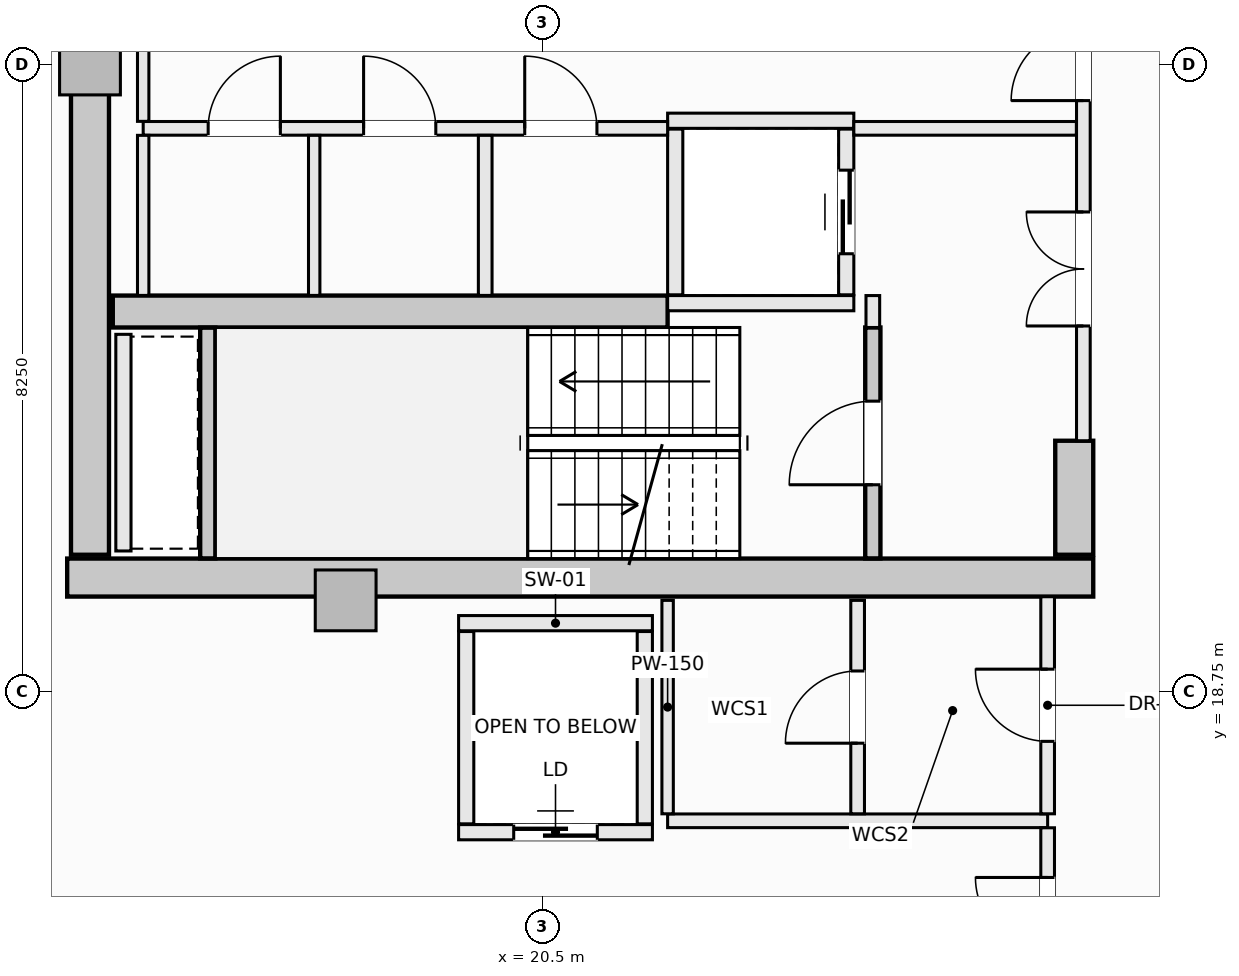
"""IFC4 building model, lengths in metres.
Left out: names, types, materials, properties, quantities, classifications, styles, units other than length and angle.
Written with IfcOpenShell. Run it as: python <this file> out.ifc"""

import sys

from ifc_helpers import new_model, si_unit, direction, frame, frame_2d, origin, origin_2d, place, context, subcontext, project, spatial, rectangle, extrude, element, fill, save


model = new_model("IFC4")
c1 = context("Model", 3, precision=1e-05, world=origin(), true_north=direction((0.0, 1.0)))
c2 = subcontext(c1, "Body", "Model", "MODEL_VIEW")
j1 = project(units=[si_unit("LENGTHUNIT", "METRE"), si_unit("PLANEANGLEUNIT", "RADIAN")], contexts=[c1])
p1 = place(None, origin())
s1 = spatial("IfcSite", under=j1, at=p1, CompositionType="ELEMENT")
p2 = place(p1, origin())
s2 = spatial("IfcBuilding", under=s1, at=p2, CompositionType="ELEMENT")
p3 = place(p2, frame((0.0, 0.0, 229.4)))
s3 = spatial("IfcBuildingStorey", under=s2, at=p3, CompositionType="ELEMENT", Elevation=229.4)
p4 = place(p3, frame((14.25, 20.25, -0.27), z_axis=(0.0, 0.0, 1.0), x_axis=(1.0, 0.0, 0.0)))
e1 = element("IfcWall", 1, at=p4, inside=s3, PredefinedType="SHEAR", context=c2, shape_type="SweptSolid", body=[
    extrude(rectangle(XDim=13.5, YDim=0.5, at=frame_2d((6.75, 0.0))), origin(), (0.0, 0.0, 1.0), 3.3),
])
p5 = place(p3, frame((14.55, 20.55, -0.27), z_axis=(0.0, 0.0, 1.0), x_axis=(0.0, 1.0, 0.0)))
e2 = element("IfcWall", 2, at=p5, inside=s3, PredefinedType="SHEAR", context=c2, shape_type="SweptSolid", body=[
    extrude(rectangle(XDim=12.9, YDim=0.5, at=frame_2d((6.45, 0.0))), origin(), (0.0, 0.0, 1.0), 3.3),
])
p6 = place(p3, frame((27.5, 20.55, -0.27), z_axis=(0.0, 0.0, 1.0), x_axis=(0.0, 1.0, 0.0)))
e3 = element("IfcWall", 3, at=p6, inside=s3, PredefinedType="SHEAR", context=c2, shape_type="SweptSolid", body=[
    extrude(rectangle(XDim=1.5, YDim=0.5, at=frame_2d((0.75, 0.0))), origin(), (0.0, 0.0, 1.0), 3.3),
])
p7 = place(p3, frame((14.85, 23.75, -0.27), z_axis=(0.0, 0.0, 1.0), x_axis=(1.0, 0.0, 0.0)))
e4 = element("IfcWall", 4, at=p7, inside=s3, PredefinedType="SHEAR", context=c2, shape_type="SweptSolid", body=[
    extrude(rectangle(XDim=7.3, YDim=0.42, at=frame_2d((3.65, 0.0))), origin(), (0.0, 0.0, 1.0), 3.3),
])
for number, where, z_axis, x_axis in (
    (5, (14.55, 27.0, -0.27), (0.0, 0.0, 1.0), (1.0, 0.0, 0.0)),
    (6, (17.914, 19.95, -0.27), (0.0, 0.0, 1.0), (1.0, 0.0, 0.0)),
):
    element("IfcColumn", number, at=place(p3, frame(where, z_axis=z_axis, x_axis=x_axis)), inside=s3, PredefinedType="PILASTER", context=c2, shape_type="SweptSolid", body=[
        extrude(rectangle(XDim=0.8, YDim=0.8, at=origin_2d()), origin(), (0.0, 0.0, 1.0), 3.3),
    ])
p8 = place(p3, frame((8.691, 17.1, 0.0), z_axis=(0.0, 0.0, 1.0), x_axis=(0.901348331142, -0.433094892545, 0.0)))
e7 = element("IfcWall", 7, at=p8, inside=s3, PredefinedType="SOLIDWALL", context=c2, shape_type="SweptSolid", body=[
    extrude(rectangle(XDim=6.021, YDim=0.3, at=frame_2d((3.01, 0.0))), origin(), (0.0, 0.0, 1.0), 2.605),
])
p9 = place(p8, frame((1.91, 0.0, 0.72)))
e8 = element("IfcOpeningElement", 8, at=p9, cuts=e7, PredefinedType="OPENING", context=c2, shape_type="SweptSolid", body=[
    extrude(rectangle(XDim=2.2, YDim=1.65, at=frame_2d((1.1, 0.825))), frame((0.0, 0.16, 0.0), z_axis=(0.0, -1.0, 0.0), x_axis=(1.0, 0.0, 0.0)), (0.0, 0.0, 1.0), 0.32),
])
p10 = place(p3, frame((24.85, 20.502, -0.27), z_axis=(0.0, 0.0, 1.0), x_axis=(0.0, 1.0, 0.0)))
e9 = element("IfcWall", 9, at=p10, inside=s3, PredefinedType="SHEAR", context=c2, shape_type="SweptSolid", body=[
    extrude(rectangle(XDim=3.038, YDim=0.2, at=frame_2d((1.519, 0.0))), origin(), (0.0, 0.0, 1.0), 3.3),
])
p11 = place(p10, frame((0.969, 0.0, 0.27)))
e10 = element("IfcOpeningElement", 10, at=p11, cuts=e9, PredefinedType="OPENING", context=c2, shape_type="SweptSolid", body=[
    extrude(rectangle(XDim=1.1, YDim=2.15, at=frame_2d((0.55, 1.075))), frame((0.0, 0.11, 0.0), z_axis=(0.0, -1.0, 0.0), x_axis=(1.0, 0.0, 0.0)), (0.0, 0.0, 1.0), 0.22),
])
p12 = place(p3, frame((16.1, 20.502, -0.27), z_axis=(0.0, 0.0, 1.0), x_axis=(0.0, 1.0, 0.0)))
e11 = element("IfcWall", 11, at=p12, inside=s3, PredefinedType="SHEAR", context=c2, shape_type="SweptSolid", body=[
    extrude(rectangle(XDim=3.036, YDim=0.2, at=frame_2d((1.518, 0.0))), origin(), (0.0, 0.0, 1.0), 3.3),
])
for number, where, z_axis, x_axis in (
    (12, (22.15, 26.26, 0.0), (0.0, 0.0, 1.0), (1.0, 0.0, 0.0)),
    (13, (22.15, 23.86, 0.0), (0.0, 0.0, 1.0), (1.0, 0.0, 0.0)),
):
    element("IfcWall", number, at=place(p3, frame(where, z_axis=z_axis, x_axis=x_axis)), inside=s3, PredefinedType="SOLIDWALL", context=c2, shape_type="SweptSolid", body=[
        extrude(rectangle(XDim=2.45, YDim=0.2, at=frame_2d((1.225, 0.0))), origin(), (0.0, 0.0, 1.0), 3.03),
    ])
p13 = place(p3, frame((22.25, 23.97, 0.0), z_axis=(0.0, 0.0, 1.0), x_axis=(0.0, 1.0, 0.0)))
e14 = element("IfcWall", 14, at=p13, inside=s3, PredefinedType="SOLIDWALL", context=c2, shape_type="SweptSolid", body=[
    extrude(rectangle(XDim=2.18, YDim=0.2, at=frame_2d((1.09, 0.0))), origin(), (0.0, 0.0, 1.0), 3.03),
])
p14 = place(p3, frame((24.5, 23.97, 0.0), z_axis=(0.0, 0.0, 1.0), x_axis=(0.0, 1.0, 0.0)))
e15 = element("IfcWall", 15, at=p14, inside=s3, PredefinedType="SOLIDWALL", context=c2, shape_type="SweptSolid", body=[
    extrude(rectangle(XDim=2.18, YDim=0.2, at=frame_2d((1.09, 0.0))), origin(), (0.0, 0.0, 1.0), 3.03),
])
p15 = place(p14, frame((0.54, 0.0, 0.0)))
e16 = element("IfcOpeningElement", 16, at=p15, cuts=e15, PredefinedType="OPENING", context=c2, shape_type="SweptSolid", body=[
    extrude(rectangle(XDim=1.1, YDim=2.2, at=frame_2d((0.55, 1.1))), frame((0.0, 0.11, 0.0), z_axis=(0.0, -1.0, 0.0), x_axis=(1.0, 0.0, 0.0)), (0.0, 0.0, 1.0), 0.22),
])
p16 = place(p3, frame((19.4, 19.65, 0.0), z_axis=(0.0, 0.0, 1.0), x_axis=(1.0, 0.0, 0.0)))
e17 = element("IfcWall", 17, at=p16, inside=s3, PredefinedType="SOLIDWALL", context=c2, shape_type="SweptSolid", body=[
    extrude(rectangle(XDim=2.55, YDim=0.2, at=frame_2d((1.275, 0.0))), origin(), (0.0, 0.0, 1.0), 3.03),
])
p17 = place(p3, frame((19.4, 16.9, 0.0), z_axis=(0.0, 0.0, 1.0), x_axis=(1.0, 0.0, 0.0)))
e18 = element("IfcWall", 18, at=p17, inside=s3, PredefinedType="SOLIDWALL", context=c2, shape_type="SweptSolid", body=[
    extrude(rectangle(XDim=2.55, YDim=0.2, at=frame_2d((1.275, 0.0))), origin(), (0.0, 0.0, 1.0), 3.03),
])
p18 = place(p17, frame((0.725, 0.0, 0.0)))
e19 = element("IfcOpeningElement", 19, at=p18, cuts=e18, PredefinedType="OPENING", context=c2, shape_type="SweptSolid", body=[
    extrude(rectangle(XDim=1.1, YDim=2.2, at=frame_2d((0.55, 1.1))), frame((0.0, 0.11, 0.0), z_axis=(0.0, -1.0, 0.0), x_axis=(1.0, 0.0, 0.0)), (0.0, 0.0, 1.0), 0.22),
])
for number, where, z_axis, x_axis in (
    (20, (19.5, 17.01, 0.0), (0.0, 0.0, 1.0), (0.0, 1.0, 0.0)),
    (21, (21.85, 17.01, 0.0), (0.0, 0.0, 1.0), (0.0, 1.0, 0.0)),
):
    element("IfcWall", number, at=place(p3, frame(where, z_axis=z_axis, x_axis=x_axis)), inside=s3, PredefinedType="SOLIDWALL", context=c2, shape_type="SweptSolid", body=[
        extrude(rectangle(XDim=2.53, YDim=0.2, at=frame_2d((1.265, 0.0))), origin(), (0.0, 0.0, 1.0), 3.03),
    ])
p19 = place(p3, frame((14.99, 20.6, 0.0), z_axis=(0.0, 0.0, 1.0), x_axis=(0.0, 1.0, 0.0)))
e22 = element("IfcWall", 22, at=p19, inside=s3, PredefinedType="SOLIDWALL", context=c2, shape_type="SweptSolid", body=[
    extrude(rectangle(XDim=2.85, YDim=0.2, at=frame_2d((1.425, 0.0))), origin(), (0.0, 0.0, 1.0), 3.03),
])
p20 = place(p3, frame((24.85, 23.54, 0.0), z_axis=(0.0, 0.0, 1.0), x_axis=(0.0, 1.0, 0.0)))
e23 = element("IfcWall", 23, at=p20, inside=s3, PredefinedType="SOLIDWALL", context=c2, shape_type="SweptSolid", body=[
    extrude(rectangle(XDim=0.42, YDim=0.18, at=frame_2d((0.21, 0.0))), origin(), (0.0, 0.0, 1.0), 3.03),
])
p21 = place(p3, frame((27.62, 22.05, 0.0), z_axis=(0.0, 0.0, 1.0), x_axis=(0.0, 1.0, 0.0)))
e24 = element("IfcWall", 24, at=p21, inside=s3, PredefinedType="SOLIDWALL", context=c2, shape_type="SweptSolid", body=[
    extrude(rectangle(XDim=9.9, YDim=0.18, at=frame_2d((4.95, 0.0))), origin(), (0.0, 0.0, 1.0), 3.03),
])
p22 = place(p21, frame((4.475, 0.0, 0.0)))
e25 = element("IfcOpeningElement", 25, at=p22, cuts=e24, PredefinedType="OPENING", context=c2, shape_type="SweptSolid", body=[
    extrude(rectangle(XDim=0.95, YDim=2.1, at=frame_2d((0.475, 1.05))), frame((0.0, 0.1, 0.0), z_axis=(0.0, -1.0, 0.0), x_axis=(1.0, 0.0, 0.0)), (0.0, 0.0, 1.0), 0.2),
])
p23 = place(p21, frame((6.89, 0.0, 0.0)))
e26 = element("IfcOpeningElement", 26, at=p23, cuts=e24, PredefinedType="OPENING", context=c2, shape_type="SweptSolid", body=[
    extrude(rectangle(XDim=1.5, YDim=2.2, at=frame_2d((0.75, 1.1))), frame((0.0, 0.1, 0.0), z_axis=(0.0, -1.0, 0.0), x_axis=(1.0, 0.0, 0.0)), (0.0, 0.0, 1.0), 0.2),
])
p24 = place(p21, frame((1.51, 0.0, 0.0)))
e27 = element("IfcOpeningElement", 27, at=p24, cuts=e24, PredefinedType="OPENING", context=c2, shape_type="SweptSolid", body=[
    extrude(rectangle(XDim=1.5, YDim=2.2, at=frame_2d((0.75, 1.1))), frame((0.0, 0.1, 0.0), z_axis=(0.0, -1.0, 0.0), x_axis=(1.0, 0.0, 0.0)), (0.0, 0.0, 1.0), 0.2),
])
p25 = place(p3, frame((15.25, 26.16, 0.0), z_axis=(0.0, 0.0, 1.0), x_axis=(1.0, 0.0, 0.0)))
e28 = element("IfcWall", 28, at=p25, inside=s3, PredefinedType="SOLIDWALL", context=c2, shape_type="SweptSolid", body=[
    extrude(rectangle(XDim=6.9, YDim=0.18, at=frame_2d((3.45, 0.0))), origin(), (0.0, 0.0, 1.0), 3.03),
])
p26 = place(p25, frame((5.02, 0.0, 0.0)))
e29 = element("IfcOpeningElement", 29, at=p26, cuts=e28, PredefinedType="OPENING", context=c2, shape_type="SweptSolid", body=[
    extrude(rectangle(XDim=0.95, YDim=2.1, at=frame_2d((0.475, 1.05))), frame((0.0, 0.1, 0.0), z_axis=(0.0, -1.0, 0.0), x_axis=(1.0, 0.0, 0.0)), (0.0, 0.0, 1.0), 0.2),
])
p27 = place(p25, frame((0.855, 0.0, 0.0)))
e30 = element("IfcOpeningElement", 30, at=p27, cuts=e28, PredefinedType="OPENING", context=c2, shape_type="SweptSolid", body=[
    extrude(rectangle(XDim=0.95, YDim=2.1, at=frame_2d((0.475, 1.05))), frame((0.0, 0.1, 0.0), z_axis=(0.0, -1.0, 0.0), x_axis=(1.0, 0.0, 0.0)), (0.0, 0.0, 1.0), 0.2),
])
p28 = place(p25, frame((2.9, 0.0, 0.0)))
e31 = element("IfcOpeningElement", 31, at=p28, cuts=e28, PredefinedType="OPENING", context=c2, shape_type="SweptSolid", body=[
    extrude(rectangle(XDim=0.95, YDim=2.1, at=frame_2d((0.475, 1.05))), frame((0.0, 0.1, 0.0), z_axis=(0.0, -1.0, 0.0), x_axis=(1.0, 0.0, 0.0)), (0.0, 0.0, 1.0), 0.2),
])
p29 = place(p3, frame((24.6, 26.16, 0.0), z_axis=(0.0, 0.0, 1.0), x_axis=(1.0, 0.0, 0.0)))
e32 = element("IfcWall", 32, at=p29, inside=s3, PredefinedType="SOLIDWALL", context=c2, shape_type="SweptSolid", body=[
    extrude(rectangle(XDim=2.928, YDim=0.18, at=frame_2d((1.464, 0.0))), origin(), (0.0, 0.0, 1.0), 3.03),
])
p30 = place(p3, frame((15.25, 23.962, 0.0), z_axis=(0.0, 0.0, 1.0), x_axis=(0.0, 1.0, 0.0)))
e33 = element("IfcWall", 33, at=p30, inside=s3, PredefinedType="PARTITIONING", context=c2, shape_type="SweptSolid", body=[
    extrude(rectangle(XDim=2.106, YDim=0.15, at=frame_2d((1.053, 0.0))), origin(), (0.0, 0.0, 1.0), 3.03),
])
p31 = place(p3, frame((15.25, 26.252, 0.0), z_axis=(0.0, 0.0, 1.0), x_axis=(0.0, 1.0, 0.0)))
e34 = element("IfcWall", 34, at=p31, inside=s3, PredefinedType="PARTITIONING", context=c2, shape_type="SweptSolid", body=[
    extrude(rectangle(XDim=1.496, YDim=0.15, at=frame_2d((0.748, 0.0))), origin(), (0.0, 0.0, 1.0), 3.03),
])
p32 = place(p3, frame((19.75, 23.962, 0.0), z_axis=(0.0, 0.0, 1.0), x_axis=(0.0, 1.0, 0.0)))
e35 = element("IfcWall", 35, at=p32, inside=s3, PredefinedType="SOLIDWALL", context=c2, shape_type="SweptSolid", body=[
    extrude(rectangle(XDim=2.106, YDim=0.18, at=frame_2d((1.053, 0.0))), origin(), (0.0, 0.0, 1.0), 3.03),
])
p33 = place(p3, frame((17.5, 23.962, 0.0), z_axis=(0.0, 0.0, 1.0), x_axis=(0.0, 1.0, 0.0)))
e36 = element("IfcWall", 36, at=p33, inside=s3, PredefinedType="PARTITIONING", context=c2, shape_type="SweptSolid", body=[
    extrude(rectangle(XDim=2.106, YDim=0.15, at=frame_2d((1.053, 0.0))), origin(), (0.0, 0.0, 1.0), 3.03),
])
p34 = place(p3, frame((22.15, 17.05, 0.0), z_axis=(0.0, 0.0, 1.0), x_axis=(1.0, 0.0, 0.0)))
e37 = element("IfcWall", 37, at=p34, inside=s3, PredefinedType="SOLIDWALL", context=c2, shape_type="SweptSolid", body=[
    extrude(rectangle(XDim=5.0, YDim=0.18, at=frame_2d((2.5, 0.0))), origin(), (0.0, 0.0, 1.0), 3.03),
])
p35 = place(p3, frame((22.15, 17.142, 0.0), z_axis=(0.0, 0.0, 1.0), x_axis=(0.0, 1.0, 0.0)))
e38 = element("IfcWall", 38, at=p35, inside=s3, PredefinedType="PARTITIONING", context=c2, shape_type="SweptSolid", body=[
    extrude(rectangle(XDim=2.808, YDim=0.15, at=frame_2d((1.404, 0.0))), origin(), (0.0, 0.0, 1.0), 3.03),
])
p36 = place(p3, frame((24.65, 17.142, 0.0), z_axis=(0.0, 0.0, 1.0), x_axis=(0.0, 1.0, 0.0)))
e39 = element("IfcWall", 39, at=p36, inside=s3, PredefinedType="SOLIDWALL", context=c2, shape_type="SweptSolid", body=[
    extrude(rectangle(XDim=2.808, YDim=0.18, at=frame_2d((1.404, 0.0))), origin(), (0.0, 0.0, 1.0), 3.03),
])
p37 = place(p36, frame((0.929, 0.0, 0.0)))
e40 = element("IfcOpeningElement", 40, at=p37, cuts=e39, PredefinedType="OPENING", context=c2, shape_type="SweptSolid", body=[
    extrude(rectangle(XDim=0.95, YDim=2.1, at=frame_2d((0.475, 1.05))), frame((0.0, 0.1, 0.0), z_axis=(0.0, -1.0, 0.0), x_axis=(1.0, 0.0, 0.0)), (0.0, 0.0, 1.0), 0.2),
])
p38 = place(p3, frame((27.15, 12.714, 0.0), z_axis=(0.0, 0.0, 1.0), x_axis=(0.0, 1.0, 0.0)))
e41 = element("IfcWall", 41, at=p38, inside=s3, PredefinedType="SOLIDWALL", context=c2, shape_type="SweptSolid", body=[
    extrude(rectangle(XDim=4.244, YDim=0.18, at=frame_2d((2.122, 0.0))), origin(), (0.0, 0.0, 1.0), 3.03),
])
p39 = place(p38, frame((0.928, 0.0, 0.0)))
e42 = element("IfcOpeningElement", 42, at=p39, cuts=e41, PredefinedType="OPENING", context=c2, shape_type="SweptSolid", body=[
    extrude(rectangle(XDim=0.95, YDim=2.1, at=frame_2d((0.475, 1.05))), frame((0.0, 0.1, 0.0), z_axis=(0.0, -1.0, 0.0), x_axis=(1.0, 0.0, 0.0)), (0.0, 0.0, 1.0), 0.2),
])
p40 = place(p38, frame((2.64, 0.0, 0.0)))
e43 = element("IfcOpeningElement", 43, at=p40, cuts=e41, PredefinedType="OPENING", context=c2, shape_type="SweptSolid", body=[
    extrude(rectangle(XDim=0.95, YDim=2.1, at=frame_2d((0.475, 1.05))), frame((0.0, 0.1, 0.0), z_axis=(0.0, -1.0, 0.0), x_axis=(1.0, 0.0, 0.0)), (0.0, 0.0, 1.0), 0.2),
])
p41 = place(p3, frame((27.15, 17.142, 0.0), z_axis=(0.0, 0.0, 1.0), x_axis=(0.0, 1.0, 0.0)))
e44 = element("IfcWall", 44, at=p41, inside=s3, PredefinedType="SOLIDWALL", context=c2, shape_type="SweptSolid", body=[
    extrude(rectangle(XDim=2.856, YDim=0.18, at=frame_2d((1.428, 0.0))), origin(), (0.0, 0.0, 1.0), 3.03),
])
p42 = place(p41, frame((0.953, 0.0, 0.0)))
e45 = element("IfcOpeningElement", 45, at=p42, cuts=e44, PredefinedType="OPENING", context=c2, shape_type="SweptSolid", body=[
    extrude(rectangle(XDim=0.95, YDim=2.1, at=frame_2d((0.475, 1.05))), frame((0.0, 0.1, 0.0), z_axis=(0.0, -1.0, 0.0), x_axis=(1.0, 0.0, 0.0)), (0.0, 0.0, 1.0), 0.2),
])
p43 = place(p11, origin())
e46 = element("IfcDoor", 46, at=p43, inside=s3, OperationType="SINGLE_SWING_LEFT", PredefinedType="DOOR", context=c2, shape_type="SweptSolid", body=[
    extrude(rectangle(XDim=1.1, YDim=2.15, at=frame_2d((0.55, 1.075))), frame((0.0, 0.025, 0.0), z_axis=(0.0, -1.0, 0.0), x_axis=(1.0, 0.0, 0.0)), (0.0, 0.0, 1.0), 0.05),
])
fill(e10, e46)
p44 = place(p15, origin())
e47 = element("IfcDoor", 47, at=p44, inside=s3, OperationType="SLIDING_TO_LEFT", PredefinedType="DOOR", context=c2, shape_type="SweptSolid", body=[
    extrude(rectangle(XDim=1.1, YDim=2.2, at=frame_2d((0.55, 1.1))), frame((0.0, 0.025, 0.0), z_axis=(0.0, -1.0, 0.0), x_axis=(1.0, 0.0, 0.0)), (0.0, 0.0, 1.0), 0.05),
])
fill(e16, e47)
p45 = place(p18, origin())
e48 = element("IfcDoor", 48, at=p45, inside=s3, OperationType="SLIDING_TO_LEFT", PredefinedType="DOOR", context=c2, shape_type="SweptSolid", body=[
    extrude(rectangle(XDim=1.1, YDim=2.2, at=frame_2d((0.55, 1.1))), frame((0.0, 0.025, 0.0), z_axis=(0.0, -1.0, 0.0), x_axis=(1.0, 0.0, 0.0)), (0.0, 0.0, 1.0), 0.05),
])
fill(e19, e48)
p46 = place(p22, origin())
e49 = element("IfcDoor", 49, at=p46, inside=s3, OperationType="SINGLE_SWING_LEFT", PredefinedType="DOOR", context=c2, shape_type="SweptSolid", body=[
    extrude(rectangle(XDim=0.95, YDim=2.1, at=frame_2d((0.475, 1.05))), frame((0.0, 0.025, 0.0), z_axis=(0.0, -1.0, 0.0), x_axis=(1.0, 0.0, 0.0)), (0.0, 0.0, 1.0), 0.05),
])
fill(e25, e49)
p47 = place(p24, origin())
e50 = element("IfcDoor", 50, at=p47, inside=s3, OperationType="DOUBLE_DOOR_SINGLE_SWING", PredefinedType="DOOR", context=c2, shape_type="SweptSolid", body=[
    extrude(rectangle(XDim=1.5, YDim=2.2, at=frame_2d((0.75, 1.1))), frame((0.0, 0.025, 0.0), z_axis=(0.0, -1.0, 0.0), x_axis=(1.0, 0.0, 0.0)), (0.0, 0.0, 1.0), 0.05),
])
fill(e27, e50)
p48 = place(p26, origin())
e51 = element("IfcDoor", 51, at=p48, inside=s3, OperationType="SINGLE_SWING_LEFT", PredefinedType="DOOR", context=c2, shape_type="SweptSolid", body=[
    extrude(rectangle(XDim=0.95, YDim=2.1, at=frame_2d((0.475, 1.05))), frame((0.0, 0.025, 0.0), z_axis=(0.0, -1.0, 0.0), x_axis=(1.0, 0.0, 0.0)), (0.0, 0.0, 1.0), 0.05),
])
fill(e29, e51)
p49 = place(p27, origin())
e52 = element("IfcDoor", 52, at=p49, inside=s3, OperationType="SINGLE_SWING_RIGHT", PredefinedType="DOOR", context=c2, shape_type="SweptSolid", body=[
    extrude(rectangle(XDim=0.95, YDim=2.1, at=frame_2d((0.475, 1.05))), frame((0.0, 0.025, 0.0), z_axis=(0.0, -1.0, 0.0), x_axis=(1.0, 0.0, 0.0)), (0.0, 0.0, 1.0), 0.05),
])
fill(e30, e52)
p50 = place(p28, origin())
e53 = element("IfcDoor", 53, at=p50, inside=s3, OperationType="SINGLE_SWING_LEFT", PredefinedType="DOOR", context=c2, shape_type="SweptSolid", body=[
    extrude(rectangle(XDim=0.95, YDim=2.1, at=frame_2d((0.475, 1.05))), frame((0.0, 0.025, 0.0), z_axis=(0.0, -1.0, 0.0), x_axis=(1.0, 0.0, 0.0)), (0.0, 0.0, 1.0), 0.05),
])
fill(e31, e53)
p51 = place(p42, origin())
e54 = element("IfcDoor", 54, at=p51, inside=s3, OperationType="SINGLE_SWING_RIGHT", PredefinedType="DOOR", context=c2, shape_type="SweptSolid", body=[
    extrude(rectangle(XDim=0.95, YDim=2.1, at=frame_2d((0.475, 1.05))), frame((0.0, 0.025, 0.0), z_axis=(0.0, -1.0, 0.0), x_axis=(1.0, 0.0, 0.0)), (0.0, 0.0, 1.0), 0.05),
])
fill(e45, e54)
p52 = place(p40, origin())
e55 = element("IfcDoor", 55, at=p52, inside=s3, OperationType="SINGLE_SWING_RIGHT", PredefinedType="DOOR", context=c2, shape_type="SweptSolid", body=[
    extrude(rectangle(XDim=0.95, YDim=2.1, at=frame_2d((0.475, 1.05))), frame((0.0, 0.025, 0.0), z_axis=(0.0, -1.0, 0.0), x_axis=(1.0, 0.0, 0.0)), (0.0, 0.0, 1.0), 0.05),
])
fill(e43, e55)
p53 = place(p37, origin())
e56 = element("IfcDoor", 56, at=p53, inside=s3, OperationType="SINGLE_SWING_LEFT", PredefinedType="DOOR", context=c2, shape_type="SweptSolid", body=[
    extrude(rectangle(XDim=0.95, YDim=2.1, at=frame_2d((0.475, 1.05))), frame((0.0, 0.025, 0.0), z_axis=(0.0, -1.0, 0.0), x_axis=(1.0, 0.0, 0.0)), (0.0, 0.0, 1.0), 0.05),
])
fill(e40, e56)
save(model, sys.argv[1])
